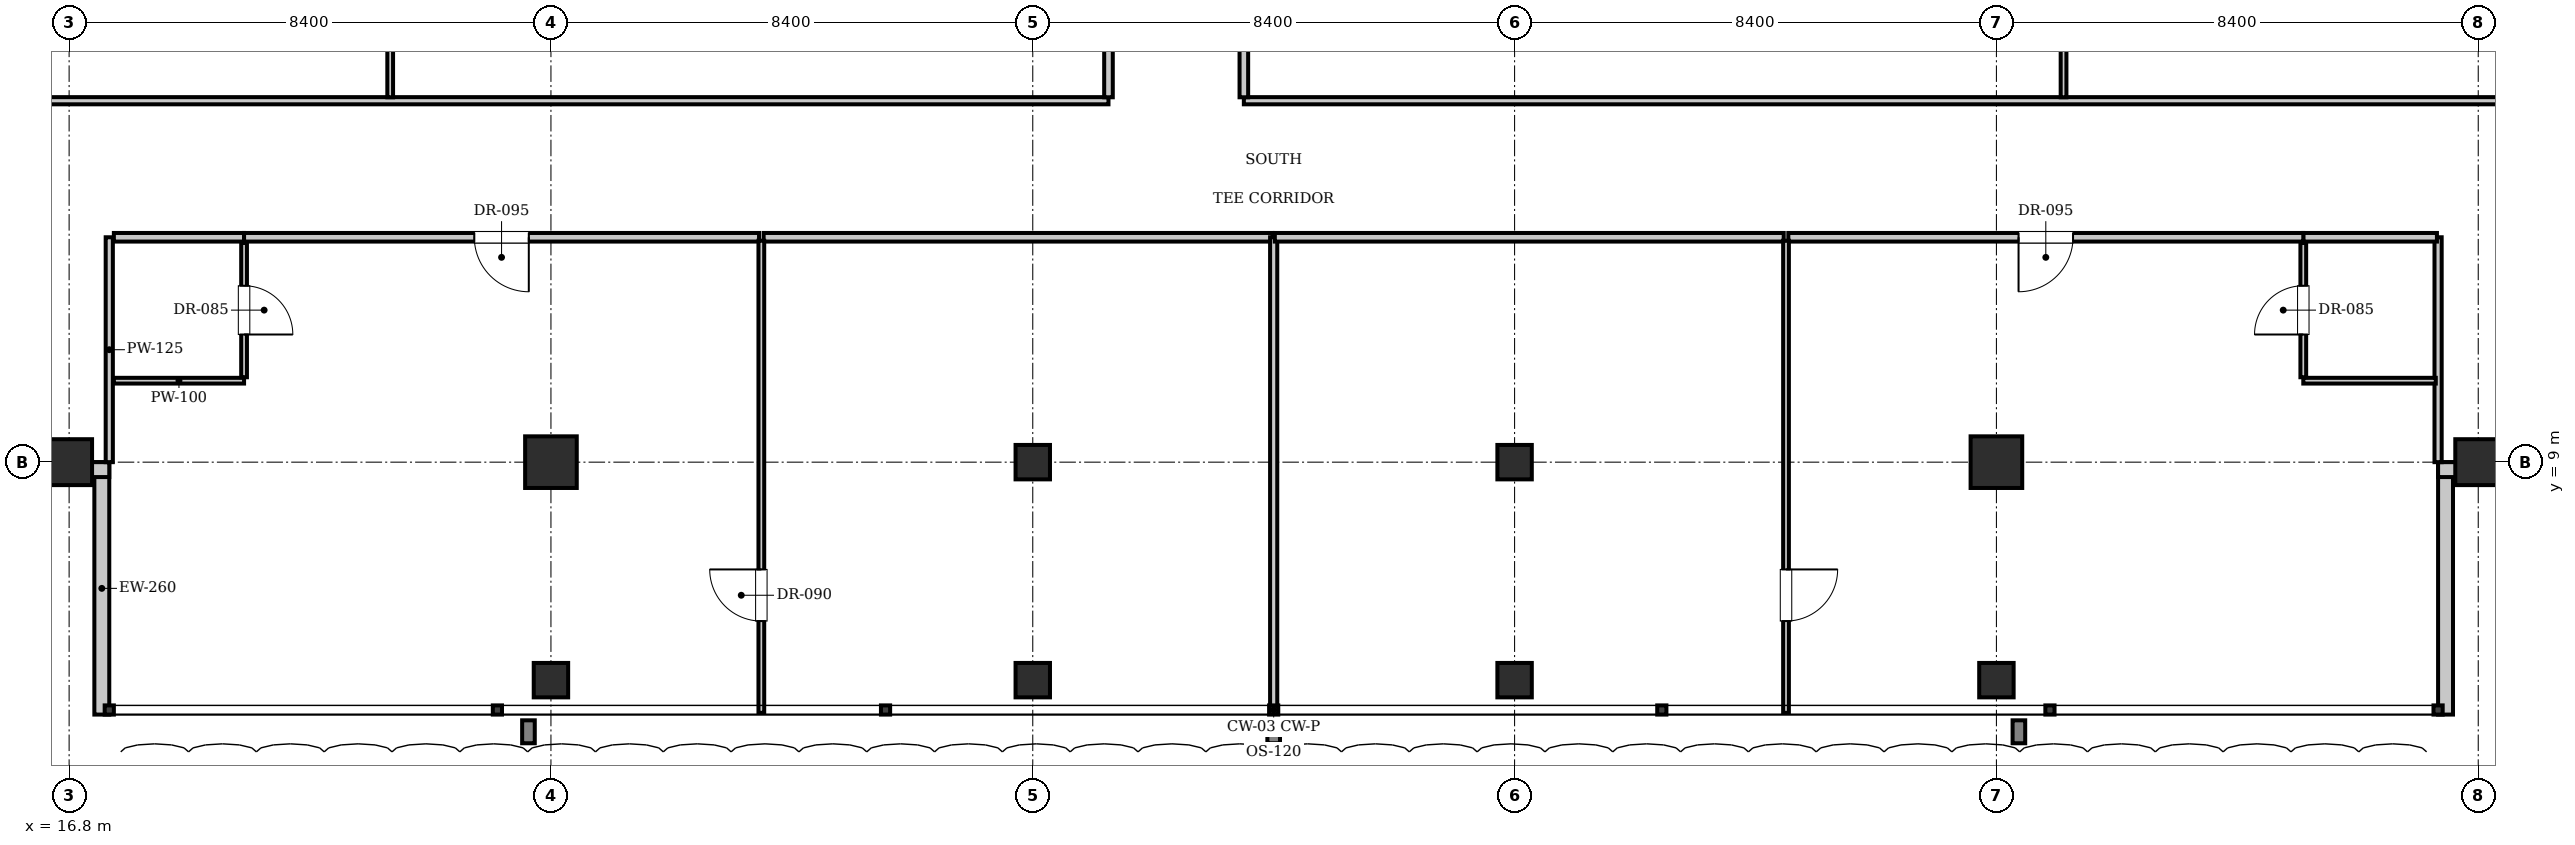
"""IFC4 building model, lengths in metres.
Left out: names, types, materials, properties, quantities, classifications, styles, units other than length and angle.
Written with IfcOpenShell. Run it as: python <this file> out.ifc"""

import sys

from ifc_helpers import new_model, si_unit, direction, frame, frame_2d, origin, origin_2d, place, context, subcontext, project, spatial, rectangle, i_section, extrude, element, fill, save


model = new_model("IFC4")
c1 = context("Model", 3, precision=1e-05, world=origin(), true_north=direction((0.0, 1.0)))
c2 = subcontext(c1, "Body", "Model", "MODEL_VIEW")
j1 = project(units=[si_unit("LENGTHUNIT", "METRE"), si_unit("PLANEANGLEUNIT", "RADIAN")], contexts=[c1])
p1 = place(None, origin())
s1 = spatial("IfcSite", under=j1, at=p1, CompositionType="ELEMENT")
p2 = place(p1, origin())
s2 = spatial("IfcBuilding", under=s1, at=p2, CompositionType="ELEMENT")
p3 = place(p2, frame((0.0, 0.0, 219.8)))
s3 = spatial("IfcBuildingStorey", under=s2, at=p3, CompositionType="ELEMENT", Elevation=219.8)
for number, where, z_axis, x_axis in (
    (1, (25.2, 9.0, 0.0), (0.0, 0.0, 1.0), (1.0, 0.0, 0.0)),
    (2, (50.4, 9.0, 0.0), (0.0, 0.0, 1.0), (1.0, 0.0, 0.0)),
):
    element("IfcColumn", number, at=place(p3, frame(where, z_axis=z_axis, x_axis=x_axis)), inside=s3, PredefinedType="COLUMN", context=c2, shape_type="SweptSolid", body=[
        extrude(rectangle(XDim=0.9, YDim=0.9, at=origin_2d()), origin(), (0.0, 0.0, 1.0), 3.85),
    ])
for number, where, z_axis, x_axis in (
    (3, (33.6, 9.0, 0.0), (0.0, 0.0, 1.0), (1.0, 0.0, 0.0)),
    (4, (42.0, 9.0, 0.0), (0.0, 0.0, 1.0), (1.0, 0.0, 0.0)),
):
    element("IfcColumn", number, at=place(p3, frame(where, z_axis=z_axis, x_axis=x_axis)), inside=s3, PredefinedType="COLUMN", context=c2, shape_type="SweptSolid", body=[
        extrude(i_section(OverallWidth=0.6, OverallDepth=0.6, WebThickness=0.025, FlangeThickness=0.038, at=origin_2d()), origin(), (0.0, 0.0, 1.0), 3.85),
    ])
for number, where, z_axis, x_axis in (
    (5, (16.8, 9.0, 0.0), (0.0, 0.0, 1.0), (1.0, 0.0, 0.0)),
    (6, (58.8, 9.0, 0.0), (0.0, 0.0, 1.0), (1.0, 0.0, 0.0)),
):
    element("IfcColumn", number, at=place(p3, frame(where, z_axis=z_axis, x_axis=x_axis)), inside=s3, PredefinedType="COLUMN", context=c2, shape_type="SweptSolid", body=[
        extrude(rectangle(XDim=0.8, YDim=0.8, at=origin_2d()), origin(), (0.0, 0.0, 1.0), 3.85),
    ])
for number, where, z_axis, x_axis in (
    (7, (25.2, 5.2, 0.0), (0.0, 0.0, 1.0), (1.0, 0.0, 0.0)),
    (8, (33.6, 5.2, 0.0), (0.0, 0.0, 1.0), (1.0, 0.0, 0.0)),
    (9, (42.0, 5.2, 0.0), (0.0, 0.0, 1.0), (1.0, 0.0, 0.0)),
    (10, (50.4, 5.2, 0.0), (0.0, 0.0, 1.0), (1.0, 0.0, 0.0)),
):
    element("IfcColumn", number, at=place(p3, frame(where, z_axis=z_axis, x_axis=x_axis)), inside=s3, PredefinedType="COLUMN", context=c2, shape_type="SweptSolid", body=[
        extrude(i_section(OverallWidth=0.6, OverallDepth=0.6, WebThickness=0.025, FlangeThickness=0.038, at=origin_2d()), origin(), (0.0, 0.0, 1.0), 3.85),
    ])
p4 = place(p3, frame((17.37, 4.6, 0.0), z_axis=(0.0, 0.0, 1.0), x_axis=(0.0, 1.0, 0.0)))
e11 = element("IfcWall", 11, at=p4, inside=s3, PredefinedType="SOLIDWALL", context=c2, shape_type="SweptSolid", body=[
    extrude(rectangle(XDim=4.4, YDim=0.26, at=frame_2d((2.2, 0.0))), origin(), (0.0, 0.0, 1.0), 3.61),
])
p5 = place(p3, frame((17.5, 8.87, 0.0), z_axis=(0.0, 0.0, 1.0), x_axis=(-1.0, 0.0, 0.0)))
e12 = element("IfcWall", 12, at=p5, inside=s3, PredefinedType="SOLIDWALL", context=c2, shape_type="SweptSolid", body=[
    extrude(rectangle(XDim=4.4, YDim=0.26, at=frame_2d((2.2, 0.0))), origin(), (0.0, 0.0, 1.0), 3.071),
])
p6 = place(p5, frame((1.3, 0.0, 0.9)))
e13 = element("IfcOpeningElement", 13, at=p6, cuts=e12, PredefinedType="OPENING", context=c2, shape_type="SweptSolid", body=[
    extrude(rectangle(XDim=1.8, YDim=2.1, at=frame_2d((0.9, 1.05))), frame((0.0, 0.14, 0.0), z_axis=(0.0, -1.0, 0.0), x_axis=(1.0, 0.0, 0.0)), (0.0, 0.0, 1.0), 0.28),
])
p7 = place(p3, frame((58.23, 9.0, 0.0), z_axis=(0.0, 0.0, 1.0), x_axis=(0.0, -1.0, 0.0)))
e14 = element("IfcWall", 14, at=p7, inside=s3, PredefinedType="SOLIDWALL", context=c2, shape_type="SweptSolid", body=[
    extrude(rectangle(XDim=4.4, YDim=0.26, at=frame_2d((2.2, 0.0))), origin(), (0.0, 0.0, 1.0), 3.61),
])
p8 = place(p3, frame((62.5, 8.87, 0.0), z_axis=(0.0, 0.0, 1.0), x_axis=(-1.0, 0.0, 0.0)))
e15 = element("IfcWall", 15, at=p8, inside=s3, PredefinedType="SOLIDWALL", context=c2, shape_type="SweptSolid", body=[
    extrude(rectangle(XDim=4.4, YDim=0.26, at=frame_2d((2.2, 0.0))), origin(), (0.0, 0.0, 1.0), 3.071),
])
p9 = place(p8, frame((1.3, 0.0, 0.9)))
e16 = element("IfcOpeningElement", 16, at=p9, cuts=e15, PredefinedType="OPENING", context=c2, shape_type="SweptSolid", body=[
    extrude(rectangle(XDim=1.8, YDim=2.1, at=frame_2d((0.9, 1.05))), frame((0.0, 0.14, 0.0), z_axis=(0.0, -1.0, 0.0), x_axis=(1.0, 0.0, 0.0)), (0.0, 0.0, 1.0), 0.28),
])
for number, where, z_axis, x_axis in (
    (17, (17.5, 9.0, 0.0), (0.0, 0.0, 1.0), (0.0, 1.0, 0.0)),
    (18, (58.1, 9.0, 0.0), (0.0, 0.0, 1.0), (0.0, 1.0, 0.0)),
):
    element("IfcWall", number, at=place(p3, frame(where, z_axis=z_axis, x_axis=x_axis)), inside=s3, PredefinedType="PARTITIONING", context=c2, shape_type="SweptSolid", body=[
        extrude(rectangle(XDim=3.92, YDim=0.125, at=frame_2d((1.96, 0.0))), origin(), (0.0, 0.0, 1.0), 3.61),
    ])
p10 = place(p3, frame((17.58, 12.92, 0.0), z_axis=(0.0, 0.0, 1.0), x_axis=(1.0, 0.0, 0.0)))
e19 = element("IfcWall", 19, at=p10, inside=s3, PredefinedType="PARTITIONING", context=c2, shape_type="SweptSolid", body=[
    extrude(rectangle(XDim=2.27, YDim=0.15, at=frame_2d((1.135, 0.0))), origin(), (0.0, 0.0, 1.0), 3.61),
])
p11 = place(p3, frame((17.58, 10.42, 0.0), z_axis=(0.0, 0.0, 1.0), x_axis=(1.0, 0.0, 0.0)))
e20 = element("IfcWall", 20, at=p11, inside=s3, PredefinedType="PARTITIONING", context=c2, shape_type="SweptSolid", body=[
    extrude(rectangle(XDim=2.27, YDim=0.1, at=frame_2d((1.135, 0.0))), origin(), (0.0, 0.0, 1.0), 3.61),
])
p12 = place(p3, frame((19.85, 10.48, 0.0), z_axis=(0.0, 0.0, 1.0), x_axis=(0.0, 1.0, 0.0)))
e21 = element("IfcWall", 21, at=p12, inside=s3, PredefinedType="PARTITIONING", context=c2, shape_type="SweptSolid", body=[
    extrude(rectangle(XDim=2.34, YDim=0.1, at=frame_2d((1.17, 0.0))), origin(), (0.0, 0.0, 1.0), 3.61),
])
p13 = place(p12, frame((0.745, 0.0, 0.0)))
e22 = element("IfcOpeningElement", 22, at=p13, cuts=e21, PredefinedType="OPENING", context=c2, shape_type="SweptSolid", body=[
    extrude(rectangle(XDim=0.85, YDim=2.1, at=frame_2d((0.425, 1.05))), frame((0.0, 0.06, 0.0), z_axis=(0.0, -1.0, 0.0), x_axis=(1.0, 0.0, 0.0)), (0.0, 0.0, 1.0), 0.12),
])
p14 = place(p3, frame((19.85, 12.92, 0.0), z_axis=(0.0, 0.0, 1.0), x_axis=(1.0, 0.0, 0.0)))
e23 = element("IfcWall", 23, at=p14, inside=s3, PredefinedType="PARTITIONING", context=c2, shape_type="SweptSolid", body=[
    extrude(rectangle(XDim=8.978, YDim=0.15, at=frame_2d((4.489, 0.0))), origin(), (0.0, 0.0, 1.0), 3.61),
])
p15 = place(p14, frame((4.014, 0.0, 0.0)))
e24 = element("IfcOpeningElement", 24, at=p15, cuts=e23, PredefinedType="OPENING", context=c2, shape_type="SweptSolid", body=[
    extrude(rectangle(XDim=0.95, YDim=2.15, at=frame_2d((0.475, 1.075))), frame((0.0, 0.085, 0.0), z_axis=(0.0, -1.0, 0.0), x_axis=(1.0, 0.0, 0.0)), (0.0, 0.0, 1.0), 0.17),
])
p16 = place(p3, frame((28.908, 12.92, 0.0), z_axis=(0.0, 0.0, 1.0), x_axis=(1.0, 0.0, 0.0)))
e25 = element("IfcWall", 25, at=p16, inside=s3, PredefinedType="PARTITIONING", context=c2, shape_type="SweptSolid", body=[
    extrude(rectangle(XDim=8.872, YDim=0.15, at=frame_2d((4.436, 0.0))), origin(), (0.0, 0.0, 1.0), 3.61),
])
p17 = place(p3, frame((28.868, 4.63, 0.0), z_axis=(0.0, 0.0, 1.0), x_axis=(0.0, 1.0, 0.0)))
e26 = element("IfcWall", 26, at=p17, inside=s3, PredefinedType="PARTITIONING", context=c2, shape_type="SweptSolid", body=[
    extrude(rectangle(XDim=8.23, YDim=0.1, at=frame_2d((4.115, 0.0))), origin(), (0.0, 0.0, 1.0), 3.61),
])
p18 = place(p17, frame((1.6, 0.0, 0.0)))
e27 = element("IfcOpeningElement", 27, at=p18, cuts=e26, PredefinedType="OPENING", context=c2, shape_type="SweptSolid", body=[
    extrude(rectangle(XDim=0.9, YDim=2.1, at=frame_2d((0.45, 1.05))), frame((0.0, 0.06, 0.0), z_axis=(0.0, -1.0, 0.0), x_axis=(1.0, 0.0, 0.0)), (0.0, 0.0, 1.0), 0.12),
])
p19 = place(p3, frame((37.8, 4.7, 0.0), z_axis=(0.0, 0.0, 1.0), x_axis=(0.0, 1.0, 0.0)))
e28 = element("IfcWall", 28, at=p19, inside=s3, PredefinedType="PARTITIONING", context=c2, shape_type="SweptSolid", body=[
    extrude(rectangle(XDim=8.22, YDim=0.125, at=frame_2d((4.11, 0.0))), origin(), (0.0, 0.0, 1.0), 3.255),
])
p20 = place(p3, frame((55.75, 12.92, 0.0), z_axis=(0.0, 0.0, 1.0), x_axis=(1.0, 0.0, 0.0)))
e29 = element("IfcWall", 29, at=p20, inside=s3, PredefinedType="PARTITIONING", context=c2, shape_type="SweptSolid", body=[
    extrude(rectangle(XDim=2.33, YDim=0.15, at=frame_2d((1.165, 0.0))), origin(), (0.0, 0.0, 1.0), 3.61),
])
p21 = place(p3, frame((55.75, 10.42, 0.0), z_axis=(0.0, 0.0, 1.0), x_axis=(1.0, 0.0, 0.0)))
e30 = element("IfcWall", 30, at=p21, inside=s3, PredefinedType="PARTITIONING", context=c2, shape_type="SweptSolid", body=[
    extrude(rectangle(XDim=2.31, YDim=0.1, at=frame_2d((1.155, 0.0))), origin(), (0.0, 0.0, 1.0), 3.61),
])
p22 = place(p3, frame((55.75, 10.48, 0.0), z_axis=(0.0, 0.0, 1.0), x_axis=(0.0, 1.0, 0.0)))
e31 = element("IfcWall", 31, at=p22, inside=s3, PredefinedType="PARTITIONING", context=c2, shape_type="SweptSolid", body=[
    extrude(rectangle(XDim=2.34, YDim=0.1, at=frame_2d((1.17, 0.0))), origin(), (0.0, 0.0, 1.0), 3.61),
])
p23 = place(p22, frame((0.745, 0.0, 0.0)))
e32 = element("IfcOpeningElement", 32, at=p23, cuts=e31, PredefinedType="OPENING", context=c2, shape_type="SweptSolid", body=[
    extrude(rectangle(XDim=0.85, YDim=2.1, at=frame_2d((0.425, 1.05))), frame((0.0, 0.06, 0.0), z_axis=(0.0, -1.0, 0.0), x_axis=(1.0, 0.0, 0.0)), (0.0, 0.0, 1.0), 0.12),
])
p24 = place(p3, frame((37.82, 12.92, 0.0), z_axis=(0.0, 0.0, 1.0), x_axis=(1.0, 0.0, 0.0)))
e33 = element("IfcWall", 33, at=p24, inside=s3, PredefinedType="PARTITIONING", context=c2, shape_type="SweptSolid", body=[
    extrude(rectangle(XDim=8.872, YDim=0.15, at=frame_2d((4.436, 0.0))), origin(), (0.0, 0.0, 1.0), 3.61),
])
p25 = place(p3, frame((46.772, 12.92, 0.0), z_axis=(0.0, 0.0, 1.0), x_axis=(1.0, 0.0, 0.0)))
e34 = element("IfcWall", 34, at=p25, inside=s3, PredefinedType="PARTITIONING", context=c2, shape_type="SweptSolid", body=[
    extrude(rectangle(XDim=8.978, YDim=0.15, at=frame_2d((4.489, 0.0))), origin(), (0.0, 0.0, 1.0), 3.61),
])
p26 = place(p25, frame((4.014, 0.0, 0.0)))
e35 = element("IfcOpeningElement", 35, at=p26, cuts=e34, PredefinedType="OPENING", context=c2, shape_type="SweptSolid", body=[
    extrude(rectangle(XDim=0.95, YDim=2.15, at=frame_2d((0.475, 1.075))), frame((0.0, 0.085, 0.0), z_axis=(0.0, -1.0, 0.0), x_axis=(1.0, 0.0, 0.0)), (0.0, 0.0, 1.0), 0.17),
])
p27 = place(p3, frame((46.732, 4.63, 0.0), z_axis=(0.0, 0.0, 1.0), x_axis=(0.0, 1.0, 0.0)))
e36 = element("IfcWall", 36, at=p27, inside=s3, PredefinedType="PARTITIONING", context=c2, shape_type="SweptSolid", body=[
    extrude(rectangle(XDim=8.23, YDim=0.1, at=frame_2d((4.115, 0.0))), origin(), (0.0, 0.0, 1.0), 3.61),
])
p28 = place(p27, frame((1.6, 0.0, 0.0)))
e37 = element("IfcOpeningElement", 37, at=p28, cuts=e36, PredefinedType="OPENING", context=c2, shape_type="SweptSolid", body=[
    extrude(rectangle(XDim=0.9, YDim=2.1, at=frame_2d((0.45, 1.05))), frame((0.0, 0.06, 0.0), z_axis=(0.0, -1.0, 0.0), x_axis=(1.0, 0.0, 0.0)), (0.0, 0.0, 1.0), 0.12),
])
p29 = place(p3, frame((13.2, 15.3, 0.0), z_axis=(0.0, 0.0, 1.0), x_axis=(1.0, 0.0, 0.0)))
e38 = element("IfcWall", 38, at=p29, inside=s3, PredefinedType="PARTITIONING", context=c2, shape_type="SweptSolid", body=[
    extrude(rectangle(XDim=21.72, YDim=0.125, at=frame_2d((10.86, 0.0))), origin(), (0.0, 0.0, 1.0), 3.61),
])
p30 = place(p3, frame((37.28, 15.3, 0.0), z_axis=(0.0, 0.0, 1.0), x_axis=(1.0, 0.0, 0.0)))
e39 = element("IfcWall", 39, at=p30, inside=s3, PredefinedType="PARTITIONING", context=c2, shape_type="SweptSolid", body=[
    extrude(rectangle(XDim=25.12, YDim=0.125, at=frame_2d((12.56, 0.0))), origin(), (0.0, 0.0, 1.0), 3.61),
])
p31 = place(p3, frame((34.92, 15.36, 0.0), z_axis=(0.0, 0.0, 1.0), x_axis=(0.0, 1.0, 0.0)))
e40 = element("IfcWall", 40, at=p31, inside=s3, PredefinedType="PARTITIONING", context=c2, shape_type="SweptSolid", body=[
    extrude(rectangle(XDim=5.49, YDim=0.15, at=frame_2d((2.745, 0.0))), origin(), (0.0, 0.0, 1.0), 3.61),
])
p32 = place(p31, frame((3.35, 0.0, 0.0)))
e41 = element("IfcOpeningElement", 41, at=p32, cuts=e40, PredefinedType="OPENING", context=c2, shape_type="SweptSolid", body=[
    extrude(rectangle(XDim=0.95, YDim=2.15, at=frame_2d((0.475, 1.075))), frame((0.0, 0.085, 0.0), z_axis=(0.0, -1.0, 0.0), x_axis=(1.0, 0.0, 0.0)), (0.0, 0.0, 1.0), 0.17),
])
p33 = place(p3, frame((22.398, 15.36, 0.0), z_axis=(0.0, 0.0, 1.0), x_axis=(0.0, 1.0, 0.0)))
e42 = element("IfcWall", 42, at=p33, inside=s3, PredefinedType="PARTITIONING", context=c2, shape_type="SweptSolid", body=[
    extrude(rectangle(XDim=7.78, YDim=0.1, at=frame_2d((3.89, 0.0))), origin(), (0.0, 0.0, 1.0), 3.61),
])
p34 = place(p33, frame((3.44, 0.0, 0.0)))
e43 = element("IfcOpeningElement", 43, at=p34, cuts=e42, PredefinedType="OPENING", context=c2, shape_type="SweptSolid", body=[
    extrude(rectangle(XDim=0.9, YDim=2.1, at=frame_2d((0.45, 1.05))), frame((0.0, 0.06, 0.0), z_axis=(0.0, -1.0, 0.0), x_axis=(1.0, 0.0, 0.0)), (0.0, 0.0, 1.0), 0.12),
])
p35 = place(p3, frame((37.28, 15.36, 0.0), z_axis=(0.0, 0.0, 1.0), x_axis=(0.0, 1.0, 0.0)))
e44 = element("IfcWall", 44, at=p35, inside=s3, PredefinedType="PARTITIONING", context=c2, shape_type="SweptSolid", body=[
    extrude(rectangle(XDim=5.49, YDim=0.15, at=frame_2d((2.745, 0.0))), origin(), (0.0, 0.0, 1.0), 3.61),
])
p36 = place(p35, frame((2.27, 0.0, 0.0)))
e45 = element("IfcOpeningElement", 45, at=p36, cuts=e44, PredefinedType="OPENING", context=c2, shape_type="SweptSolid", body=[
    extrude(rectangle(XDim=0.95, YDim=2.15, at=frame_2d((0.475, 1.075))), frame((0.0, 0.085, 0.0), z_axis=(0.0, -1.0, 0.0), x_axis=(1.0, 0.0, 0.0)), (0.0, 0.0, 1.0), 0.17),
])
p37 = place(p3, frame((51.57, 15.36, 0.0), z_axis=(0.0, 0.0, 1.0), x_axis=(0.0, 1.0, 0.0)))
e46 = element("IfcWall", 46, at=p37, inside=s3, PredefinedType="PARTITIONING", context=c2, shape_type="SweptSolid", body=[
    extrude(rectangle(XDim=7.78, YDim=0.1, at=frame_2d((3.89, 0.0))), origin(), (0.0, 0.0, 1.0), 3.61),
])
p38 = place(p37, frame((3.44, 0.0, 0.0)))
e47 = element("IfcOpeningElement", 47, at=p38, cuts=e46, PredefinedType="OPENING", context=c2, shape_type="SweptSolid", body=[
    extrude(rectangle(XDim=0.9, YDim=2.1, at=frame_2d((0.45, 1.05))), frame((0.0, 0.06, 0.0), z_axis=(0.0, -1.0, 0.0), x_axis=(1.0, 0.0, 0.0)), (0.0, 0.0, 1.0), 0.12),
])
p39 = place(p13, frame((0.85, 0.0, 0.0), z_axis=(0.0, 0.0, 1.0), x_axis=(-1.0, 0.0, 0.0)))
e48 = element("IfcDoor", 48, at=p39, inside=s3, OperationType="SINGLE_SWING_RIGHT", PredefinedType="DOOR", context=c2, shape_type="SweptSolid", body=[
    extrude(rectangle(XDim=0.85, YDim=2.1, at=frame_2d((0.425, 1.05))), frame((0.0, 0.025, 0.0), z_axis=(0.0, -1.0, 0.0), x_axis=(1.0, 0.0, 0.0)), (0.0, 0.0, 1.0), 0.05),
])
fill(e22, e48)
p40 = place(p15, frame((0.95, 0.0, 0.0), z_axis=(0.0, 0.0, 1.0), x_axis=(-1.0, 0.0, 0.0)))
e49 = element("IfcDoor", 49, at=p40, inside=s3, OperationType="SINGLE_SWING_LEFT", PredefinedType="DOOR", context=c2, shape_type="SweptSolid", body=[
    extrude(rectangle(XDim=0.95, YDim=2.15, at=frame_2d((0.475, 1.075))), frame((0.0, 0.025, 0.0), z_axis=(0.0, -1.0, 0.0), x_axis=(1.0, 0.0, 0.0)), (0.0, 0.0, 1.0), 0.05),
])
fill(e24, e49)
p41 = place(p18, origin())
e50 = element("IfcDoor", 50, at=p41, inside=s3, OperationType="SINGLE_SWING_RIGHT", PredefinedType="DOOR", context=c2, shape_type="SweptSolid", body=[
    extrude(rectangle(XDim=0.9, YDim=2.1, at=frame_2d((0.45, 1.05))), frame((0.0, 0.025, 0.0), z_axis=(0.0, -1.0, 0.0), x_axis=(1.0, 0.0, 0.0)), (0.0, 0.0, 1.0), 0.05),
])
fill(e27, e50)
p42 = place(p23, origin())
e51 = element("IfcDoor", 51, at=p42, inside=s3, OperationType="SINGLE_SWING_LEFT", PredefinedType="DOOR", context=c2, shape_type="SweptSolid", body=[
    extrude(rectangle(XDim=0.85, YDim=2.1, at=frame_2d((0.425, 1.05))), frame((0.0, 0.025, 0.0), z_axis=(0.0, -1.0, 0.0), x_axis=(1.0, 0.0, 0.0)), (0.0, 0.0, 1.0), 0.05),
])
fill(e32, e51)
p43 = place(p26, frame((0.95, 0.0, 0.0), z_axis=(0.0, 0.0, 1.0), x_axis=(-1.0, 0.0, 0.0)))
e52 = element("IfcDoor", 52, at=p43, inside=s3, OperationType="SINGLE_SWING_RIGHT", PredefinedType="DOOR", context=c2, shape_type="SweptSolid", body=[
    extrude(rectangle(XDim=0.95, YDim=2.15, at=frame_2d((0.475, 1.075))), frame((0.0, 0.025, 0.0), z_axis=(0.0, -1.0, 0.0), x_axis=(1.0, 0.0, 0.0)), (0.0, 0.0, 1.0), 0.05),
])
fill(e35, e52)
p44 = place(p28, frame((0.9, 0.0, 0.0), z_axis=(0.0, 0.0, 1.0), x_axis=(-1.0, 0.0, 0.0)))
e53 = element("IfcDoor", 53, at=p44, inside=s3, OperationType="SINGLE_SWING_LEFT", PredefinedType="DOOR", context=c2, shape_type="SweptSolid", body=[
    extrude(rectangle(XDim=0.9, YDim=2.1, at=frame_2d((0.45, 1.05))), frame((0.0, 0.025, 0.0), z_axis=(0.0, -1.0, 0.0), x_axis=(1.0, 0.0, 0.0)), (0.0, 0.0, 1.0), 0.05),
])
fill(e37, e53)
save(model, sys.argv[1])
